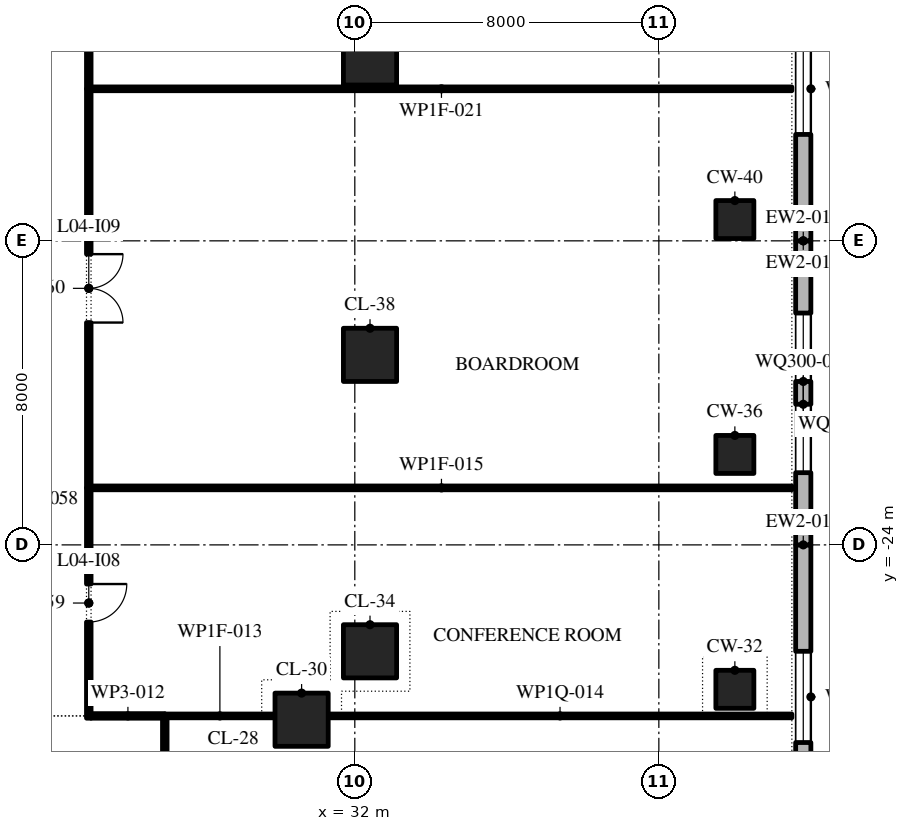
"""IFC4 building model, lengths in metres.
Left out: names, types, materials, properties, quantities, classifications, styles, units other than length and angle.
Written with IfcOpenShell. Run it as: python <this file> out.ifc"""

import sys

from ifc_helpers import new_model, si_unit, direction, frame, frame_2d, origin, origin_2d, place, context, subcontext, project, spatial, polyline, rectangle, outline, extrude, element, fill, save


model = new_model("IFC4")
c1 = context("Model", 3, precision=1e-05, world=origin(), true_north=direction((0.0, 1.0)))
c2 = subcontext(c1, "Body", "Model", "MODEL_VIEW")
j1 = project(units=[si_unit("LENGTHUNIT", "METRE"), si_unit("PLANEANGLEUNIT", "RADIAN")], contexts=[c1])
p1 = place(None, origin())
s1 = spatial("IfcSite", under=j1, at=p1, CompositionType="ELEMENT")
p2 = place(p1, origin())
s2 = spatial("IfcBuilding", under=s1, at=p2, CompositionType="ELEMENT")
p3 = place(p2, frame((0.0, 0.0, 24.0)))
s3 = spatial("IfcBuildingStorey", under=s2, at=p3, CompositionType="ELEMENT", Elevation=24.0)
p4 = place(p3, frame((30.6, -28.6, 0.0), z_axis=(0.0, 0.0, 1.0), x_axis=(1.0, 0.0, 0.0)))
e1 = element("IfcColumn", 1, at=p4, inside=s3, PredefinedType="COLUMN", context=c2, shape_type="SweptSolid", body=[
    extrude(rectangle(XDim=1.4, YDim=1.4, at=origin_2d()), origin(), (0.0, 0.0, 1.0), 4.8),
])
p5 = place(p3, frame((42.0, -27.8, 0.0), z_axis=(0.0, 0.0, 1.0), x_axis=(1.0, 0.0, 0.0)))
e2 = element("IfcColumn", 2, at=p5, inside=s3, PredefinedType="COLUMN", context=c2, shape_type="SweptSolid", body=[
    extrude(rectangle(XDim=1.0, YDim=1.0, at=origin_2d()), origin(), (0.0, 0.0, 1.0), 4.8),
])
p6 = place(p3, frame((32.4, -26.8, 0.0), z_axis=(0.0, 0.0, 1.0), x_axis=(1.0, 0.0, 0.0)))
e3 = element("IfcColumn", 3, at=p6, inside=s3, PredefinedType="COLUMN", context=c2, shape_type="SweptSolid", body=[
    extrude(rectangle(XDim=1.4, YDim=1.4, at=origin_2d()), origin(), (0.0, 0.0, 1.0), 4.8),
])
p7 = place(p3, frame((42.0, -21.62, 0.0), z_axis=(0.0, 0.0, 1.0), x_axis=(1.0, 0.0, 0.0)))
e4 = element("IfcColumn", 4, at=p7, inside=s3, PredefinedType="COLUMN", context=c2, shape_type="SweptSolid", body=[
    extrude(rectangle(XDim=1.0, YDim=1.0, at=origin_2d()), origin(), (0.0, 0.0, 1.0), 4.8),
])
p8 = place(p3, frame((32.4, -19.0, 0.0), z_axis=(0.0, 0.0, 1.0), x_axis=(1.0, 0.0, 0.0)))
e5 = element("IfcColumn", 5, at=p8, inside=s3, PredefinedType="COLUMN", context=c2, shape_type="SweptSolid", body=[
    extrude(rectangle(XDim=1.4, YDim=1.4, at=origin_2d()), origin(), (0.0, 0.0, 1.0), 4.8),
])
p9 = place(p3, frame((42.0, -15.44, 0.0), z_axis=(0.0, 0.0, 1.0), x_axis=(1.0, 0.0, 0.0)))
e6 = element("IfcColumn", 6, at=p9, inside=s3, PredefinedType="COLUMN", context=c2, shape_type="SweptSolid", body=[
    extrude(rectangle(XDim=1.0, YDim=1.0, at=origin_2d()), origin(), (0.0, 0.0, 1.0), 4.8),
])
p10 = place(p3, frame((32.4, -11.2, 0.0), z_axis=(0.0, 0.0, 1.0), x_axis=(1.0, 0.0, 0.0)))
e7 = element("IfcColumn", 7, at=p10, inside=s3, PredefinedType="COLUMN", context=c2, shape_type="SweptSolid", body=[
    extrude(rectangle(XDim=1.4, YDim=1.4, at=origin_2d()), origin(), (0.0, 0.0, 1.0), 4.8),
])
p11 = place(p3, frame((43.8, -32.0, 0.0), z_axis=(0.0, 0.0, 1.0), x_axis=(0.0, 1.0, 0.0)))
e8 = element("IfcWall", 8, at=p11, inside=s3, PredefinedType="STANDARD", context=c2, shape_type="SweptSolid", body=[
    extrude(rectangle(XDim=8.0, YDim=0.4, at=frame_2d((4.0, 0.0))), origin(), (0.0, 0.0, 1.0), 4.5),
])
p12 = place(p11, frame((2.8, 0.0, 0.9)))
e9 = element("IfcOpeningElement", 9, at=p12, cuts=e8, PredefinedType="OPENING", context=c2, shape_type="SweptSolid", body=[
    extrude(outline(polyline([(0.0, 0.0), (2.4, 0.0), (2.4, 1.5), (2.378, 1.758), (2.313, 2.009), (2.207, 2.245), (2.063, 2.46), (1.885, 2.648), (1.677, 2.804), (1.447, 2.922), (1.2, 3.0), (0.953, 2.922), (0.722, 2.804), (0.515, 2.648), (0.337, 2.46), (0.193, 2.245), (0.087, 2.009), (0.022, 1.758), (0.0, 1.5), (0.0, 0.0)])), frame((0.0, 0.21, 0.0), z_axis=(0.0, -1.0, 0.0), x_axis=(1.0, 0.0, 0.0)), (0.0, 0.0, 1.0), 0.42),
])
p13 = place(p3, frame((43.8, -24.0, 0.0), z_axis=(0.0, 0.0, 1.0), x_axis=(0.0, 1.0, 0.0)))
e10 = element("IfcWall", 10, at=p13, inside=s3, PredefinedType="STANDARD", context=c2, shape_type="SweptSolid", body=[
    extrude(rectangle(XDim=8.0, YDim=0.4, at=frame_2d((4.0, 0.0))), origin(), (0.0, 0.0, 1.0), 4.5),
])
p14 = place(p13, frame((1.9, 0.0, 0.9)))
e11 = element("IfcOpeningElement", 11, at=p14, cuts=e10, PredefinedType="OPENING", context=c2, shape_type="SweptSolid", body=[
    extrude(outline(polyline([(0.0, 0.0), (1.8, 0.0), (1.8, 1.5), (1.785, 1.729), (1.738, 1.954), (1.662, 2.17), (1.558, 2.375), (1.427, 2.563), (1.271, 2.732), (1.095, 2.879), (0.9, 3.0), (0.705, 2.879), (0.529, 2.732), (0.373, 2.563), (0.242, 2.375), (0.138, 2.17), (0.062, 1.954), (0.015, 1.729), (0.0, 1.5), (0.0, 0.0)])), frame((0.0, 0.21, 0.0), z_axis=(0.0, -1.0, 0.0), x_axis=(1.0, 0.0, 0.0)), (0.0, 0.0, 1.0), 0.42),
])
p15 = place(p13, frame((4.3, 0.0, 0.9)))
e12 = element("IfcOpeningElement", 12, at=p15, cuts=e10, PredefinedType="OPENING", context=c2, shape_type="SweptSolid", body=[
    extrude(outline(polyline([(0.0, 0.0), (1.8, 0.0), (1.8, 1.5), (1.785, 1.729), (1.738, 1.954), (1.662, 2.17), (1.558, 2.375), (1.427, 2.563), (1.271, 2.732), (1.095, 2.879), (0.9, 3.0), (0.705, 2.879), (0.529, 2.732), (0.373, 2.563), (0.242, 2.375), (0.138, 2.17), (0.062, 1.954), (0.015, 1.729), (0.0, 1.5), (0.0, 0.0)])), frame((0.0, 0.21, 0.0), z_axis=(0.0, -1.0, 0.0), x_axis=(1.0, 0.0, 0.0)), (0.0, 0.0, 1.0), 0.42),
])
p16 = place(p3, frame((43.8, -16.0, 0.0), z_axis=(0.0, 0.0, 1.0), x_axis=(0.0, 1.0, 0.0)))
e13 = element("IfcWall", 13, at=p16, inside=s3, PredefinedType="STANDARD", context=c2, shape_type="SweptSolid", body=[
    extrude(rectangle(XDim=8.0, YDim=0.4, at=frame_2d((4.0, 0.0))), origin(), (0.0, 0.0, 1.0), 4.5),
])
p17 = place(p16, frame((2.8, 0.0, 0.9)))
e14 = element("IfcOpeningElement", 14, at=p17, cuts=e13, PredefinedType="OPENING", context=c2, shape_type="SweptSolid", body=[
    extrude(outline(polyline([(0.0, 0.0), (2.4, 0.0), (2.4, 1.5), (2.378, 1.758), (2.313, 2.009), (2.207, 2.245), (2.063, 2.46), (1.885, 2.648), (1.677, 2.804), (1.447, 2.922), (1.2, 3.0), (0.953, 2.922), (0.722, 2.804), (0.515, 2.648), (0.337, 2.46), (0.193, 2.245), (0.087, 2.009), (0.022, 1.758), (0.0, 1.5), (0.0, 0.0)])), frame((0.0, 0.21, 0.0), z_axis=(0.0, -1.0, 0.0), x_axis=(1.0, 0.0, 0.0)), (0.0, 0.0, 1.0), 0.42),
])
p18 = place(p3, frame((25.06, -28.5, 0.0), z_axis=(0.0, 0.0, 1.0), x_axis=(1.0, 0.0, 0.0)))
e15 = element("IfcWall", 15, at=p18, inside=s3, PredefinedType="PARTITIONING", context=c2, shape_type="SweptSolid", body=[
    extrude(rectangle(XDim=1.94, YDim=0.12, at=frame_2d((0.97, 0.0))), origin(), (0.0, 0.0, 1.0), 4.5),
])
p19 = place(p3, frame((27.0, -28.5, 0.0), z_axis=(0.0, 0.0, 1.0), x_axis=(1.0, 0.0, 0.0)))
e16 = element("IfcWall", 16, at=p19, inside=s3, PredefinedType="PARTITIONING", context=c2, shape_type="SweptSolid", body=[
    extrude(rectangle(XDim=2.9, YDim=0.1, at=frame_2d((1.45, 0.0))), origin(), (0.0, 0.0, 1.0), 4.5),
])
p20 = place(p3, frame((31.3, -28.5, 0.0), z_axis=(0.0, 0.0, 1.0), x_axis=(1.0, 0.0, 0.0)))
e17 = element("IfcWall", 17, at=p20, inside=s3, PredefinedType="PARTITIONING", context=c2, shape_type="SweptSolid", body=[
    extrude(rectangle(XDim=12.2, YDim=0.1, at=frame_2d((6.1, 0.0))), origin(), (0.0, 0.0, 1.0), 3.964),
])
for number, where, z_axis, x_axis in (
    (18, (25.06, -22.5, 0.0), (0.0, 0.0, 1.0), (1.0, 0.0, 0.0)),
    (19, (25.06, -12.0, 0.0), (0.0, 0.0, 1.0), (1.0, 0.0, 0.0)),
):
    element("IfcWall", number, at=place(p3, frame(where, z_axis=z_axis, x_axis=x_axis)), inside=s3, PredefinedType="PARTITIONING", context=c2, shape_type="SweptSolid", body=[
        extrude(rectangle(XDim=18.44, YDim=0.1, at=frame_2d((9.22, 0.0))), origin(), (0.0, 0.0, 1.0), 4.5),
    ])
p21 = place(p3, frame((25.0, -28.56, 0.0), z_axis=(0.0, 0.0, 1.0), x_axis=(0.0, 1.0, 0.0)))
e20 = element("IfcWall", 20, at=p21, inside=s3, PredefinedType="PARTITIONING", context=c2, shape_type="SweptSolid", body=[
    extrude(rectangle(XDim=6.06, YDim=0.12, at=frame_2d((3.03, 0.0))), origin(), (0.0, 0.0, 1.0), 4.5),
])
p22 = place(p21, frame((2.53, 0.0, 0.0)))
e21 = element("IfcOpeningElement", 21, at=p22, cuts=e20, PredefinedType="OPENING", context=c2, shape_type="SweptSolid", body=[
    extrude(rectangle(XDim=1.0, YDim=2.1, at=frame_2d((0.5, 1.05))), frame((0.0, 0.07, 0.0), z_axis=(0.0, -1.0, 0.0), x_axis=(1.0, 0.0, 0.0)), (0.0, 0.0, 1.0), 0.14),
])
p23 = place(p3, frame((25.0, -22.5, 0.0), z_axis=(0.0, 0.0, 1.0), x_axis=(0.0, 1.0, 0.0)))
e22 = element("IfcWall", 22, at=p23, inside=s3, PredefinedType="PARTITIONING", context=c2, shape_type="SweptSolid", body=[
    extrude(rectangle(XDim=10.5, YDim=0.12, at=frame_2d((5.25, 0.0))), origin(), (0.0, 0.0, 1.0), 4.5),
])
p24 = place(p23, frame((4.35, 0.0, 0.0)))
e23 = element("IfcOpeningElement", 23, at=p24, cuts=e22, PredefinedType="OPENING", context=c2, shape_type="SweptSolid", body=[
    extrude(rectangle(XDim=1.8, YDim=2.1, at=frame_2d((0.9, 1.05))), frame((0.0, 0.07, 0.0), z_axis=(0.0, -1.0, 0.0), x_axis=(1.0, 0.0, 0.0)), (0.0, 0.0, 1.0), 0.14),
])
p25 = place(p3, frame((25.0, -12.0, 0.0), z_axis=(0.0, 0.0, 1.0), x_axis=(0.0, 1.0, 0.0)))
e24 = element("IfcWall", 24, at=p25, inside=s3, PredefinedType="PARTITIONING", context=c2, shape_type="SweptSolid", body=[
    extrude(rectangle(XDim=12.5, YDim=0.12, at=frame_2d((6.25, 0.0))), origin(), (0.0, 0.0, 1.0), 4.5),
])
p26 = place(p25, frame((5.35, 0.0, 0.0)))
e25 = element("IfcOpeningElement", 25, at=p26, cuts=e24, PredefinedType="OPENING", context=c2, shape_type="SweptSolid", body=[
    extrude(rectangle(XDim=1.8, YDim=2.1, at=frame_2d((0.9, 1.05))), frame((0.0, 0.07, 0.0), z_axis=(0.0, -1.0, 0.0), x_axis=(1.0, 0.0, 0.0)), (0.0, 0.0, 1.0), 0.14),
])
p27 = place(p3, frame((27.0, -32.0, 0.0), z_axis=(0.0, 0.0, 1.0), x_axis=(0.0, 1.0, 0.0)))
e26 = element("IfcWall", 26, at=p27, inside=s3, PredefinedType="PARTITIONING", context=c2, shape_type="SweptSolid", body=[
    extrude(rectangle(XDim=3.44, YDim=0.12, at=frame_2d((1.72, 0.0))), origin(), (0.0, 0.0, 1.0), 4.5),
])
p28 = place(p12, origin())
e27 = element("IfcWindow", 27, at=p28, inside=s3, PartitioningType="DOUBLE_PANEL_VERTICAL", PredefinedType="WINDOW", context=c2, shape_type="SweptSolid", body=[
    extrude(outline(polyline([(0.0, 0.0), (2.4, 0.0), (2.4, 1.5), (2.378, 1.758), (2.313, 2.009), (2.207, 2.245), (2.063, 2.46), (1.885, 2.648), (1.677, 2.804), (1.447, 2.922), (1.2, 3.0), (0.953, 2.922), (0.722, 2.804), (0.515, 2.648), (0.337, 2.46), (0.193, 2.245), (0.087, 2.009), (0.022, 1.758), (0.0, 1.5), (0.0, 0.0)])), frame((0.0, 0.03, 0.0), z_axis=(0.0, -1.0, 0.0), x_axis=(1.0, 0.0, 0.0)), (0.0, 0.0, 1.0), 0.06),
])
fill(e9, e27)
p29 = place(p14, origin())
e28 = element("IfcWindow", 28, at=p29, inside=s3, PartitioningType="DOUBLE_PANEL_VERTICAL", PredefinedType="WINDOW", context=c2, shape_type="SweptSolid", body=[
    extrude(outline(polyline([(0.0, 0.0), (1.8, 0.0), (1.8, 1.5), (1.785, 1.729), (1.738, 1.954), (1.662, 2.17), (1.558, 2.375), (1.427, 2.563), (1.271, 2.732), (1.095, 2.879), (0.9, 3.0), (0.705, 2.879), (0.529, 2.732), (0.373, 2.563), (0.242, 2.375), (0.138, 2.17), (0.062, 1.954), (0.015, 1.729), (0.0, 1.5), (0.0, 0.0)])), frame((0.0, 0.03, 0.0), z_axis=(0.0, -1.0, 0.0), x_axis=(1.0, 0.0, 0.0)), (0.0, 0.0, 1.0), 0.06),
])
fill(e11, e28)
p30 = place(p15, origin())
e29 = element("IfcWindow", 29, at=p30, inside=s3, PartitioningType="DOUBLE_PANEL_VERTICAL", PredefinedType="WINDOW", context=c2, shape_type="SweptSolid", body=[
    extrude(outline(polyline([(0.0, 0.0), (1.8, 0.0), (1.8, 1.5), (1.785, 1.729), (1.738, 1.954), (1.662, 2.17), (1.558, 2.375), (1.427, 2.563), (1.271, 2.732), (1.095, 2.879), (0.9, 3.0), (0.705, 2.879), (0.529, 2.732), (0.373, 2.563), (0.242, 2.375), (0.138, 2.17), (0.062, 1.954), (0.015, 1.729), (0.0, 1.5), (0.0, 0.0)])), frame((0.0, 0.03, 0.0), z_axis=(0.0, -1.0, 0.0), x_axis=(1.0, 0.0, 0.0)), (0.0, 0.0, 1.0), 0.06),
])
fill(e12, e29)
p31 = place(p17, origin())
e30 = element("IfcWindow", 30, at=p31, inside=s3, PartitioningType="DOUBLE_PANEL_VERTICAL", PredefinedType="WINDOW", context=c2, shape_type="SweptSolid", body=[
    extrude(outline(polyline([(0.0, 0.0), (2.4, 0.0), (2.4, 1.5), (2.378, 1.758), (2.313, 2.009), (2.207, 2.245), (2.063, 2.46), (1.885, 2.648), (1.677, 2.804), (1.447, 2.922), (1.2, 3.0), (0.953, 2.922), (0.722, 2.804), (0.515, 2.648), (0.337, 2.46), (0.193, 2.245), (0.087, 2.009), (0.022, 1.758), (0.0, 1.5), (0.0, 0.0)])), frame((0.0, 0.03, 0.0), z_axis=(0.0, -1.0, 0.0), x_axis=(1.0, 0.0, 0.0)), (0.0, 0.0, 1.0), 0.06),
])
fill(e14, e30)
p32 = place(p22, frame((1.0, 0.0, 0.0), z_axis=(0.0, 0.0, 1.0), x_axis=(-1.0, 0.0, 0.0)))
e31 = element("IfcDoor", 31, at=p32, inside=s3, OperationType="SINGLE_SWING_RIGHT", PredefinedType="DOOR", context=c2, shape_type="SweptSolid", body=[
    extrude(rectangle(XDim=1.0, YDim=2.1, at=frame_2d((0.5, 1.05))), frame((0.0, 0.025, 0.0), z_axis=(0.0, -1.0, 0.0), x_axis=(1.0, 0.0, 0.0)), (0.0, 0.0, 1.0), 0.05),
])
fill(e21, e31)
p33 = place(p24, frame((1.8, 0.0, 0.0), z_axis=(0.0, 0.0, 1.0), x_axis=(-1.0, 0.0, 0.0)))
e32 = element("IfcDoor", 32, at=p33, inside=s3, OperationType="SINGLE_SWING_RIGHT", PredefinedType="DOOR", context=c2, shape_type="SweptSolid", body=[
    extrude(rectangle(XDim=1.8, YDim=2.1, at=frame_2d((0.9, 1.05))), frame((0.0, 0.025, 0.0), z_axis=(0.0, -1.0, 0.0), x_axis=(1.0, 0.0, 0.0)), (0.0, 0.0, 1.0), 0.05),
])
fill(e23, e32)
save(model, sys.argv[1])
